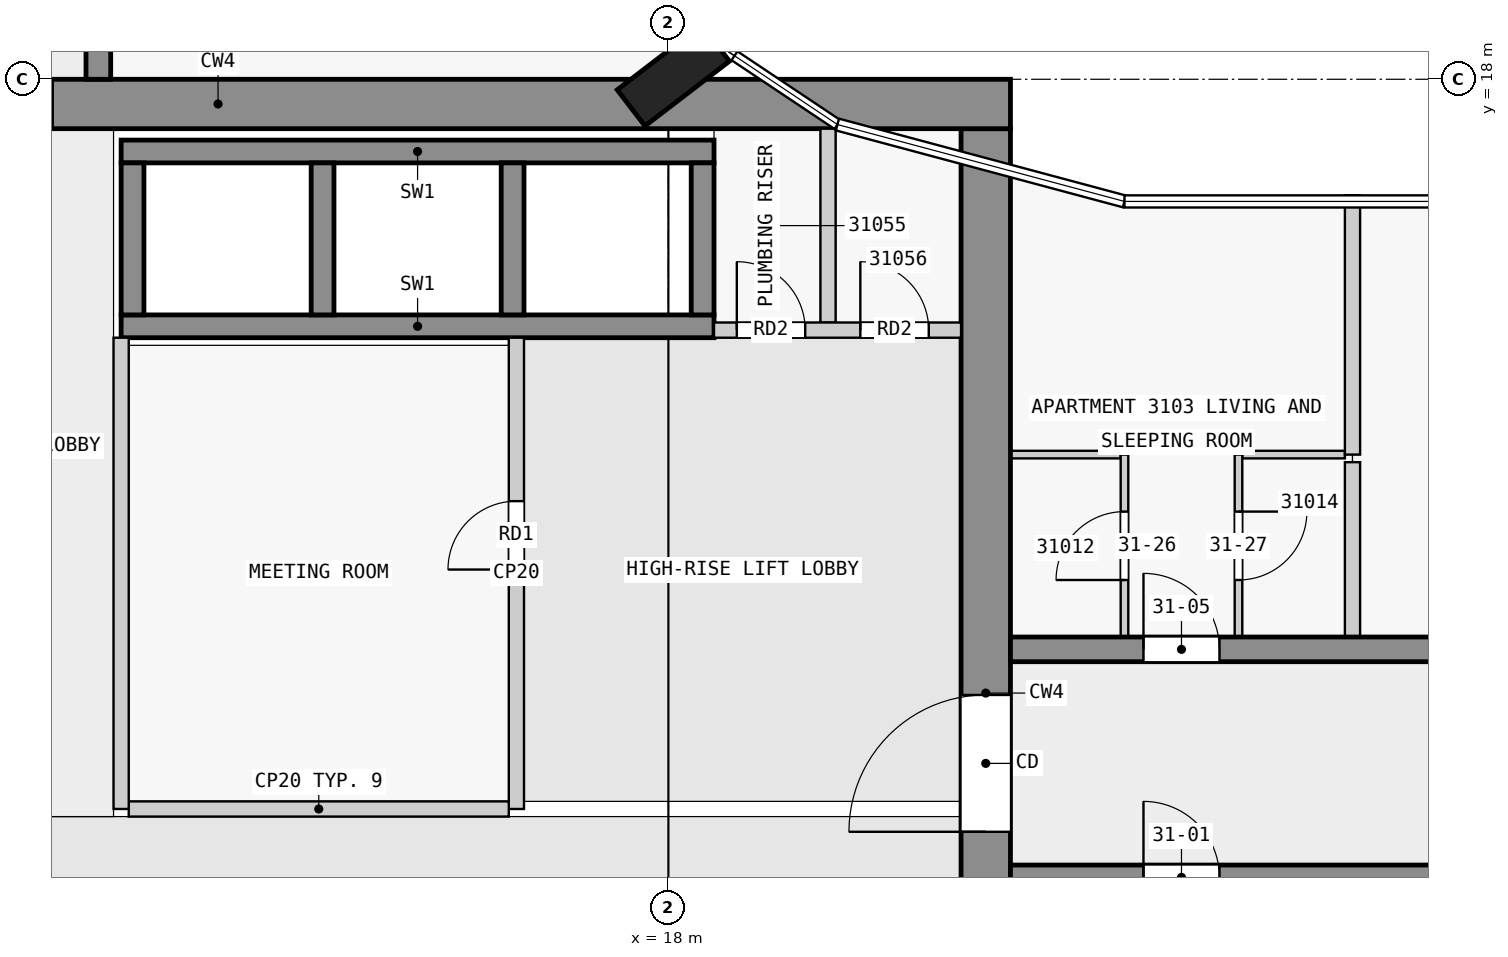
"""IFC4 building model, lengths in metres.
Left out: names, types, materials, properties, quantities, classifications, styles, units other than length and angle.
Written with IfcOpenShell. Run it as: python <this file> out.ifc"""

import sys

from ifc_helpers import new_model, si_unit, direction, frame, frame_2d, origin, origin_2d, place, context, subcontext, project, spatial, rectangle, extrude, element, fill, save


model = new_model("IFC4")
c1 = context("Model", 3, precision=1e-05, world=origin(), true_north=direction((0.0, 1.0)))
c2 = subcontext(c1, "Body", "Model", "MODEL_VIEW")
j1 = project(units=[si_unit("LENGTHUNIT", "METRE"), si_unit("PLANEANGLEUNIT", "RADIAN")], contexts=[c1])
p1 = place(None, origin())
s1 = spatial("IfcSite", under=j1, at=p1, CompositionType="ELEMENT")
p2 = place(p1, origin())
s2 = spatial("IfcBuilding", under=s1, at=p2, CompositionType="ELEMENT")
p3 = place(p2, frame((0.0, 0.0, 120.3)))
s3 = spatial("IfcBuildingStorey", under=s2, at=p3, CompositionType="ELEMENT", Elevation=120.3)
p4 = place(p3, frame((18.065, 18.05, 0.0), z_axis=(0.0, 0.0, 1.0), x_axis=(-0.608810846443, 0.793315418515, 0.0)))
e1 = element("IfcColumn", 1, at=p4, inside=s3, PredefinedType="COLUMN", context=c2, shape_type="SweptSolid", body=[
    extrude(rectangle(XDim=0.6, YDim=1.4, at=origin_2d()), origin(), (0.0, 0.0, 1.0), 3.5),
])
p5 = place(p3, frame((1.65, 17.675, 0.0), z_axis=(0.0, 0.0, 1.0), x_axis=(1.0, 0.0, 0.0)))
e2 = element("IfcWall", 2, at=p5, inside=s3, PredefinedType="SHEAR", context=c2, shape_type="SweptSolid", body=[
    extrude(rectangle(XDim=20.85, YDim=0.65, at=frame_2d((10.425, 0.0))), origin(), (0.0, 0.0, 1.0), 3.2),
])
p6 = place(p5, frame((6.45, 0.0, 0.0)))
e3 = element("IfcOpeningElement", 3, at=p6, cuts=e2, PredefinedType="OPENING", context=c2, shape_type="SweptSolid", body=[
    extrude(rectangle(XDim=1.8, YDim=2.1, at=frame_2d((0.9, 1.05))), frame((0.0, 0.335, 0.0), z_axis=(0.0, -1.0, 0.0), x_axis=(1.0, 0.0, 0.0)), (0.0, 0.0, 1.0), 0.67),
])
p7 = place(p3, frame((22.175, 2.5, 0.0), z_axis=(0.0, 0.0, 1.0), x_axis=(0.0, 1.0, 0.0)))
e4 = element("IfcWall", 4, at=p7, inside=s3, PredefinedType="SHEAR", context=c2, shape_type="SweptSolid", body=[
    extrude(rectangle(XDim=14.85, YDim=0.65, at=frame_2d((7.425, 0.0))), origin(), (0.0, 0.0, 1.0), 3.2),
])
p8 = place(p7, frame((5.6, 0.0, 0.0)))
e5 = element("IfcOpeningElement", 5, at=p8, cuts=e4, PredefinedType="OPENING", context=c2, shape_type="SweptSolid", body=[
    extrude(rectangle(XDim=1.8, YDim=2.1, at=frame_2d((0.9, 1.05))), frame((0.0, 0.335, 0.0), z_axis=(0.0, -1.0, 0.0), x_axis=(1.0, 0.0, 0.0)), (0.0, 0.0, 1.0), 0.67),
])
for number, where, z_axis, x_axis in (
    (6, (10.8, 17.05, 0.0), (0.0, 0.0, 1.0), (1.0, 0.0, 0.0)),
    (7, (10.8, 14.75, 0.0), (0.0, 0.0, 1.0), (1.0, 0.0, 0.0)),
):
    element("IfcWall", number, at=place(p3, frame(where, z_axis=z_axis, x_axis=x_axis)), inside=s3, PredefinedType="SHEAR", context=c2, shape_type="SweptSolid", body=[
        extrude(rectangle(XDim=7.8, YDim=0.3, at=frame_2d((3.9, 0.0))), origin(), (0.0, 0.0, 1.0), 3.2),
    ])
for number, where, z_axis, x_axis in (
    (8, (10.95, 14.9, 0.0), (0.0, 0.0, 1.0), (0.0, 1.0, 0.0)),
    (9, (13.45, 14.9, 0.0), (0.0, 0.0, 1.0), (0.0, 1.0, 0.0)),
    (10, (15.95, 14.9, 0.0), (0.0, 0.0, 1.0), (0.0, 1.0, 0.0)),
    (11, (18.45, 14.9, 0.0), (0.0, 0.0, 1.0), (0.0, 1.0, 0.0)),
):
    element("IfcWall", number, at=place(p3, frame(where, z_axis=z_axis, x_axis=x_axis)), inside=s3, PredefinedType="SHEAR", context=c2, shape_type="SweptSolid", body=[
        extrude(rectangle(XDim=2.0, YDim=0.3, at=frame_2d((1.0, 0.0))), origin(), (0.0, 0.0, 1.0), 3.2),
    ])
p9 = place(p3, frame((22.5, 7.5, 0.0), z_axis=(0.0, 0.0, 1.0), x_axis=(1.0, 0.0, 0.0)))
e12 = element("IfcWall", 12, at=p9, inside=s3, PredefinedType="SHEAR", context=c2, shape_type="SweptSolid", body=[
    extrude(rectangle(XDim=22.5, YDim=0.325, at=frame_2d((11.25, 0.0))), origin(), (0.0, 0.0, 1.0), 3.2),
])
p10 = place(p9, frame((1.75, 0.0, 0.0)))
e13 = element("IfcOpeningElement", 13, at=p10, cuts=e12, PredefinedType="OPENING", context=c2, shape_type="SweptSolid", body=[
    extrude(rectangle(XDim=1.0, YDim=2.1, at=frame_2d((0.5, 1.05))), frame((0.0, 0.172, 0.0), z_axis=(0.0, -1.0, 0.0), x_axis=(1.0, 0.0, 0.0)), (0.0, 0.0, 1.0), 0.345),
])
p11 = place(p9, frame((6.25, 0.0, 0.0)))
e14 = element("IfcOpeningElement", 14, at=p11, cuts=e12, PredefinedType="OPENING", context=c2, shape_type="SweptSolid", body=[
    extrude(rectangle(XDim=1.0, YDim=2.1, at=frame_2d((0.5, 1.05))), frame((0.0, 0.172, 0.0), z_axis=(0.0, -1.0, 0.0), x_axis=(1.0, 0.0, 0.0)), (0.0, 0.0, 1.0), 0.345),
])
p12 = place(p9, frame((10.75, 0.0, 0.0)))
e15 = element("IfcOpeningElement", 15, at=p12, cuts=e12, PredefinedType="OPENING", context=c2, shape_type="SweptSolid", body=[
    extrude(rectangle(XDim=1.0, YDim=2.1, at=frame_2d((0.5, 1.05))), frame((0.0, 0.172, 0.0), z_axis=(0.0, -1.0, 0.0), x_axis=(1.0, 0.0, 0.0)), (0.0, 0.0, 1.0), 0.345),
])
p13 = place(p9, frame((16.85, 0.0, 0.0)))
e16 = element("IfcOpeningElement", 16, at=p13, cuts=e12, PredefinedType="OPENING", context=c2, shape_type="SweptSolid", body=[
    extrude(rectangle(XDim=1.0, YDim=2.1, at=frame_2d((0.5, 1.05))), frame((0.0, 0.172, 0.0), z_axis=(0.0, -1.0, 0.0), x_axis=(1.0, 0.0, 0.0)), (0.0, 0.0, 1.0), 0.345),
])
p14 = place(p3, frame((22.5, 10.5, 0.0), z_axis=(0.0, 0.0, 1.0), x_axis=(1.0, 0.0, 0.0)))
e17 = element("IfcWall", 17, at=p14, inside=s3, PredefinedType="SHEAR", context=c2, shape_type="SweptSolid", body=[
    extrude(rectangle(XDim=22.5, YDim=0.325, at=frame_2d((11.25, 0.0))), origin(), (0.0, 0.0, 1.0), 3.2),
])
p15 = place(p14, frame((1.75, 0.0, 0.0)))
e18 = element("IfcOpeningElement", 18, at=p15, cuts=e17, PredefinedType="OPENING", context=c2, shape_type="SweptSolid", body=[
    extrude(rectangle(XDim=1.0, YDim=2.1, at=frame_2d((0.5, 1.05))), frame((0.0, 0.172, 0.0), z_axis=(0.0, -1.0, 0.0), x_axis=(1.0, 0.0, 0.0)), (0.0, 0.0, 1.0), 0.345),
])
p16 = place(p14, frame((8.55, 0.0, 0.0)))
e19 = element("IfcOpeningElement", 19, at=p16, cuts=e17, PredefinedType="OPENING", context=c2, shape_type="SweptSolid", body=[
    extrude(rectangle(XDim=1.0, YDim=2.1, at=frame_2d((0.5, 1.05))), frame((0.0, 0.172, 0.0), z_axis=(0.0, -1.0, 0.0), x_axis=(1.0, 0.0, 0.0)), (0.0, 0.0, 1.0), 0.345),
])
p17 = place(p14, frame((15.25, 0.0, 0.0)))
e20 = element("IfcOpeningElement", 20, at=p17, cuts=e17, PredefinedType="OPENING", context=c2, shape_type="SweptSolid", body=[
    extrude(rectangle(XDim=1.0, YDim=2.1, at=frame_2d((0.5, 1.05))), frame((0.0, 0.172, 0.0), z_axis=(0.0, -1.0, 0.0), x_axis=(1.0, 0.0, 0.0)), (0.0, 0.0, 1.0), 0.345),
])
p18 = place(p14, frame((18.75, 0.0, 0.0)))
e21 = element("IfcOpeningElement", 21, at=p18, cuts=e17, PredefinedType="OPENING", context=c2, shape_type="SweptSolid", body=[
    extrude(rectangle(XDim=0.9, YDim=2.1, at=frame_2d((0.45, 1.05))), frame((0.0, 0.172, 0.0), z_axis=(0.0, -1.0, 0.0), x_axis=(1.0, 0.0, 0.0)), (0.0, 0.0, 1.0), 0.345),
])
p19 = place(p14, frame((20.95, 0.0, 0.0)))
e22 = element("IfcOpeningElement", 22, at=p19, cuts=e17, PredefinedType="OPENING", context=c2, shape_type="SweptSolid", body=[
    extrude(rectangle(XDim=1.0, YDim=2.1, at=frame_2d((0.5, 1.05))), frame((0.0, 0.172, 0.0), z_axis=(0.0, -1.0, 0.0), x_axis=(1.0, 0.0, 0.0)), (0.0, 0.0, 1.0), 0.345),
])
p20 = place(p3, frame((10.5, 18.0, 0.0), z_axis=(0.0, 0.0, 1.0), x_axis=(0.0, 1.0, 0.0)))
e23 = element("IfcWall", 23, at=p20, inside=s3, PredefinedType="SHEAR", context=c2, shape_type="SweptSolid", body=[
    extrude(rectangle(XDim=27.0, YDim=0.325, at=frame_2d((13.5, 0.0))), origin(), (0.0, 0.0, 1.0), 3.2),
])
p21 = place(p20, frame((1.75, 0.0, 0.0)))
e24 = element("IfcOpeningElement", 24, at=p21, cuts=e23, PredefinedType="OPENING", context=c2, shape_type="SweptSolid", body=[
    extrude(rectangle(XDim=1.0, YDim=2.1, at=frame_2d((0.5, 1.05))), frame((0.0, 0.172, 0.0), z_axis=(0.0, -1.0, 0.0), x_axis=(1.0, 0.0, 0.0)), (0.0, 0.0, 1.0), 0.345),
])
p22 = place(p20, frame((6.25, 0.0, 0.0)))
e25 = element("IfcOpeningElement", 25, at=p22, cuts=e23, PredefinedType="OPENING", context=c2, shape_type="SweptSolid", body=[
    extrude(rectangle(XDim=1.0, YDim=2.1, at=frame_2d((0.5, 1.05))), frame((0.0, 0.172, 0.0), z_axis=(0.0, -1.0, 0.0), x_axis=(1.0, 0.0, 0.0)), (0.0, 0.0, 1.0), 0.345),
])
p23 = place(p20, frame((13.05, 0.0, 0.0)))
e26 = element("IfcOpeningElement", 26, at=p23, cuts=e23, PredefinedType="OPENING", context=c2, shape_type="SweptSolid", body=[
    extrude(rectangle(XDim=1.0, YDim=2.1, at=frame_2d((0.5, 1.05))), frame((0.0, 0.172, 0.0), z_axis=(0.0, -1.0, 0.0), x_axis=(1.0, 0.0, 0.0)), (0.0, 0.0, 1.0), 0.345),
])
p24 = place(p20, frame((19.75, 0.0, 0.0)))
e27 = element("IfcOpeningElement", 27, at=p24, cuts=e23, PredefinedType="OPENING", context=c2, shape_type="SweptSolid", body=[
    extrude(rectangle(XDim=1.0, YDim=2.1, at=frame_2d((0.5, 1.05))), frame((0.0, 0.172, 0.0), z_axis=(0.0, -1.0, 0.0), x_axis=(1.0, 0.0, 0.0)), (0.0, 0.0, 1.0), 0.345),
])
p25 = place(p20, frame((23.25, 0.0, 0.0)))
e28 = element("IfcOpeningElement", 28, at=p25, cuts=e23, PredefinedType="OPENING", context=c2, shape_type="SweptSolid", body=[
    extrude(rectangle(XDim=0.9, YDim=2.1, at=frame_2d((0.45, 1.05))), frame((0.0, 0.172, 0.0), z_axis=(0.0, -1.0, 0.0), x_axis=(1.0, 0.0, 0.0)), (0.0, 0.0, 1.0), 0.345),
])
p26 = place(p20, frame((25.45, 0.0, 0.0)))
e29 = element("IfcOpeningElement", 29, at=p26, cuts=e23, PredefinedType="OPENING", context=c2, shape_type="SweptSolid", body=[
    extrude(rectangle(XDim=1.0, YDim=2.1, at=frame_2d((0.5, 1.05))), frame((0.0, 0.172, 0.0), z_axis=(0.0, -1.0, 0.0), x_axis=(1.0, 0.0, 0.0)), (0.0, 0.0, 1.0), 0.345),
])
p27 = place(p3, frame((10.8, 8.4, 0.0), z_axis=(0.0, 0.0, 1.0), x_axis=(0.0, 1.0, 0.0)))
e30 = element("IfcWall", 30, at=p27, inside=s3, PredefinedType="PARTITIONING", context=c2, shape_type="SweptSolid", body=[
    extrude(rectangle(XDim=6.2, YDim=0.2, at=frame_2d((3.1, 0.0))), origin(), (0.0, 0.0, 1.0), 3.2),
])
p28 = place(p3, frame((10.9, 8.4, 0.0), z_axis=(0.0, 0.0, 1.0), x_axis=(1.0, 0.0, 0.0)))
e31 = element("IfcWall", 31, at=p28, inside=s3, PredefinedType="PARTITIONING", context=c2, shape_type="SweptSolid", body=[
    extrude(rectangle(XDim=5.0, YDim=0.2, at=frame_2d((2.5, 0.0))), origin(), (0.0, 0.0, 1.0), 3.2),
])
p29 = place(p3, frame((16.0, 8.4, 0.0), z_axis=(0.0, 0.0, 1.0), x_axis=(0.0, 1.0, 0.0)))
e32 = element("IfcWall", 32, at=p29, inside=s3, PredefinedType="PARTITIONING", context=c2, shape_type="SweptSolid", body=[
    extrude(rectangle(XDim=6.2, YDim=0.2, at=frame_2d((3.1, 0.0))), origin(), (0.0, 0.0, 1.0), 3.2),
])
p30 = place(p29, frame((3.15, 0.0, 0.0)))
e33 = element("IfcOpeningElement", 33, at=p30, cuts=e32, PredefinedType="OPENING", context=c2, shape_type="SweptSolid", body=[
    extrude(rectangle(XDim=0.9, YDim=2.1, at=frame_2d((0.45, 1.05))), frame((0.0, 0.11, 0.0), z_axis=(0.0, -1.0, 0.0), x_axis=(1.0, 0.0, 0.0)), (0.0, 0.0, 1.0), 0.22),
])
p31 = place(p3, frame((18.6, 14.7, 0.0), z_axis=(0.0, 0.0, 1.0), x_axis=(1.0, 0.0, 0.0)))
e34 = element("IfcWall", 34, at=p31, inside=s3, PredefinedType="PARTITIONING", context=c2, shape_type="SweptSolid", body=[
    extrude(rectangle(XDim=3.25, YDim=0.2, at=frame_2d((1.625, 0.0))), origin(), (0.0, 0.0, 1.0), 3.2),
])
p32 = place(p31, frame((0.3, 0.0, 0.0)))
e35 = element("IfcOpeningElement", 35, at=p32, cuts=e34, PredefinedType="OPENING", context=c2, shape_type="SweptSolid", body=[
    extrude(rectangle(XDim=0.9, YDim=2.1, at=frame_2d((0.45, 1.05))), frame((0.0, 0.11, 0.0), z_axis=(0.0, -1.0, 0.0), x_axis=(1.0, 0.0, 0.0)), (0.0, 0.0, 1.0), 0.22),
])
p33 = place(p31, frame((1.925, 0.0, 0.0)))
e36 = element("IfcOpeningElement", 36, at=p33, cuts=e34, PredefinedType="OPENING", context=c2, shape_type="SweptSolid", body=[
    extrude(rectangle(XDim=0.9, YDim=2.1, at=frame_2d((0.45, 1.05))), frame((0.0, 0.11, 0.0), z_axis=(0.0, -1.0, 0.0), x_axis=(1.0, 0.0, 0.0)), (0.0, 0.0, 1.0), 0.22),
])
p34 = place(p3, frame((20.1, 14.8, 0.0), z_axis=(0.0, 0.0, 1.0), x_axis=(0.0, 1.0, 0.0)))
e37 = element("IfcWall", 37, at=p34, inside=s3, PredefinedType="PARTITIONING", context=c2, shape_type="SweptSolid", body=[
    extrude(rectangle(XDim=2.55, YDim=0.2, at=frame_2d((1.275, 0.0))), origin(), (0.0, 0.0, 1.0), 3.2),
])
p35 = place(p3, frame((23.95, 13.062, 0.0), z_axis=(0.0, 0.0, 1.0), x_axis=(-1.0, 0.0, 0.0)))
e38 = element("IfcWall", 38, at=p35, inside=s3, PredefinedType="PARTITIONING", context=c2, shape_type="SweptSolid", body=[
    extrude(rectangle(XDim=1.45, YDim=0.1, at=frame_2d((0.725, 0.0))), origin(), (0.0, 0.0, 1.0), 3.2),
])
p36 = place(p3, frame((26.9, 13.062, 0.0), z_axis=(0.0, 0.0, 1.0), x_axis=(-1.0, 0.0, 0.0)))
e39 = element("IfcWall", 39, at=p36, inside=s3, PredefinedType="PARTITIONING", context=c2, shape_type="SweptSolid", body=[
    extrude(rectangle(XDim=1.35, YDim=0.1, at=frame_2d((0.675, 0.0))), origin(), (0.0, 0.0, 1.0), 3.2),
])
p37 = place(p3, frame((24.0, 10.663, 0.0), z_axis=(0.0, 0.0, 1.0), x_axis=(0.0, 1.0, 0.0)))
e40 = element("IfcWall", 40, at=p37, inside=s3, PredefinedType="PARTITIONING", context=c2, shape_type="SweptSolid", body=[
    extrude(rectangle(XDim=2.4, YDim=0.1, at=frame_2d((1.2, 0.0))), origin(), (0.0, 0.0, 1.0), 3.2),
])
p38 = place(p37, frame((0.75, 0.0, 0.0)))
e41 = element("IfcOpeningElement", 41, at=p38, cuts=e40, PredefinedType="OPENING", context=c2, shape_type="SweptSolid", body=[
    extrude(rectangle(XDim=0.9, YDim=2.1, at=frame_2d((0.45, 1.05))), frame((0.0, 0.06, 0.0), z_axis=(0.0, -1.0, 0.0), x_axis=(1.0, 0.0, 0.0)), (0.0, 0.0, 1.0), 0.12),
])
p39 = place(p3, frame((25.5, 13.062, 0.0), z_axis=(0.0, 0.0, 1.0), x_axis=(0.0, -1.0, 0.0)))
e42 = element("IfcWall", 42, at=p39, inside=s3, PredefinedType="PARTITIONING", context=c2, shape_type="SweptSolid", body=[
    extrude(rectangle(XDim=2.4, YDim=0.1, at=frame_2d((1.2, 0.0))), origin(), (0.0, 0.0, 1.0), 3.2),
])
p40 = place(p39, frame((0.75, 0.0, 0.0)))
e43 = element("IfcOpeningElement", 43, at=p40, cuts=e42, PredefinedType="OPENING", context=c2, shape_type="SweptSolid", body=[
    extrude(rectangle(XDim=0.9, YDim=2.1, at=frame_2d((0.45, 1.05))), frame((0.0, 0.06, 0.0), z_axis=(0.0, -1.0, 0.0), x_axis=(1.0, 0.0, 0.0)), (0.0, 0.0, 1.0), 0.12),
])
p41 = place(p3, frame((27.0, 16.473, 0.0), z_axis=(0.0, 0.0, 1.0), x_axis=(0.0, -1.0, 0.0)))
e44 = element("IfcWall", 44, at=p41, inside=s3, PredefinedType="PARTITIONING", context=c2, shape_type="SweptSolid", body=[
    extrude(rectangle(XDim=3.411, YDim=0.2, at=frame_2d((1.705, 0.0))), origin(), (0.0, 0.0, 1.0), 3.2),
])
p42 = place(p3, frame((27.0, 10.663, 0.0), z_axis=(0.0, 0.0, 1.0), x_axis=(0.0, 1.0, 0.0)))
e45 = element("IfcWall", 45, at=p42, inside=s3, PredefinedType="PARTITIONING", context=c2, shape_type="SweptSolid", body=[
    extrude(rectangle(XDim=2.3, YDim=0.2, at=frame_2d((1.15, 0.0))), origin(), (0.0, 0.0, 1.0), 3.2),
])
p43 = place(p30, origin())
e46 = element("IfcDoor", 46, at=p43, inside=s3, OperationType="SINGLE_SWING_LEFT", PredefinedType="DOOR", context=c2, shape_type="SweptSolid", body=[
    extrude(rectangle(XDim=0.9, YDim=2.1, at=frame_2d((0.45, 1.05))), frame((0.0, 0.025, 0.0), z_axis=(0.0, -1.0, 0.0), x_axis=(1.0, 0.0, 0.0)), (0.0, 0.0, 1.0), 0.05),
])
fill(e33, e46)
p44 = place(p8, origin())
e47 = element("IfcDoor", 47, at=p44, inside=s3, OperationType="DOUBLE_DOOR_SINGLE_SWING", PredefinedType="DOOR", context=c2, shape_type="SweptSolid", body=[
    extrude(rectangle(XDim=1.8, YDim=2.1, at=frame_2d((0.9, 1.05))), frame((0.0, 0.025, 0.0), z_axis=(0.0, -1.0, 0.0), x_axis=(1.0, 0.0, 0.0)), (0.0, 0.0, 1.0), 0.05),
])
fill(e5, e47)
p45 = place(p32, origin())
e48 = element("IfcDoor", 48, at=p45, inside=s3, OperationType="SINGLE_SWING_LEFT", PredefinedType="DOOR", context=c2, shape_type="SweptSolid", body=[
    extrude(rectangle(XDim=0.9, YDim=2.1, at=frame_2d((0.45, 1.05))), frame((0.0, 0.025, 0.0), z_axis=(0.0, -1.0, 0.0), x_axis=(1.0, 0.0, 0.0)), (0.0, 0.0, 1.0), 0.05),
])
fill(e35, e48)
p46 = place(p33, origin())
e49 = element("IfcDoor", 49, at=p46, inside=s3, OperationType="SINGLE_SWING_LEFT", PredefinedType="DOOR", context=c2, shape_type="SweptSolid", body=[
    extrude(rectangle(XDim=0.9, YDim=2.1, at=frame_2d((0.45, 1.05))), frame((0.0, 0.025, 0.0), z_axis=(0.0, -1.0, 0.0), x_axis=(1.0, 0.0, 0.0)), (0.0, 0.0, 1.0), 0.05),
])
fill(e36, e49)
p47 = place(p10, origin())
e50 = element("IfcDoor", 50, at=p47, inside=s3, OperationType="SINGLE_SWING_LEFT", PredefinedType="DOOR", context=c2, shape_type="SweptSolid", body=[
    extrude(rectangle(XDim=1.0, YDim=2.1, at=frame_2d((0.5, 1.05))), frame((0.0, 0.025, 0.0), z_axis=(0.0, -1.0, 0.0), x_axis=(1.0, 0.0, 0.0)), (0.0, 0.0, 1.0), 0.05),
])
fill(e13, e50)
p48 = place(p15, origin())
e51 = element("IfcDoor", 51, at=p48, inside=s3, OperationType="SINGLE_SWING_LEFT", PredefinedType="DOOR", context=c2, shape_type="SweptSolid", body=[
    extrude(rectangle(XDim=1.0, YDim=2.1, at=frame_2d((0.5, 1.05))), frame((0.0, 0.025, 0.0), z_axis=(0.0, -1.0, 0.0), x_axis=(1.0, 0.0, 0.0)), (0.0, 0.0, 1.0), 0.05),
])
fill(e18, e51)
p49 = place(p38, origin())
e52 = element("IfcDoor", 52, at=p49, inside=s3, OperationType="SINGLE_SWING_LEFT", PredefinedType="DOOR", context=c2, shape_type="SweptSolid", body=[
    extrude(rectangle(XDim=0.9, YDim=2.1, at=frame_2d((0.45, 1.05))), frame((0.0, 0.025, 0.0), z_axis=(0.0, -1.0, 0.0), x_axis=(1.0, 0.0, 0.0)), (0.0, 0.0, 1.0), 0.05),
])
fill(e41, e52)
p50 = place(p40, origin())
e53 = element("IfcDoor", 53, at=p50, inside=s3, OperationType="SINGLE_SWING_LEFT", PredefinedType="DOOR", context=c2, shape_type="SweptSolid", body=[
    extrude(rectangle(XDim=0.9, YDim=2.1, at=frame_2d((0.45, 1.05))), frame((0.0, 0.025, 0.0), z_axis=(0.0, -1.0, 0.0), x_axis=(1.0, 0.0, 0.0)), (0.0, 0.0, 1.0), 0.05),
])
fill(e43, e53)
save(model, sys.argv[1])
